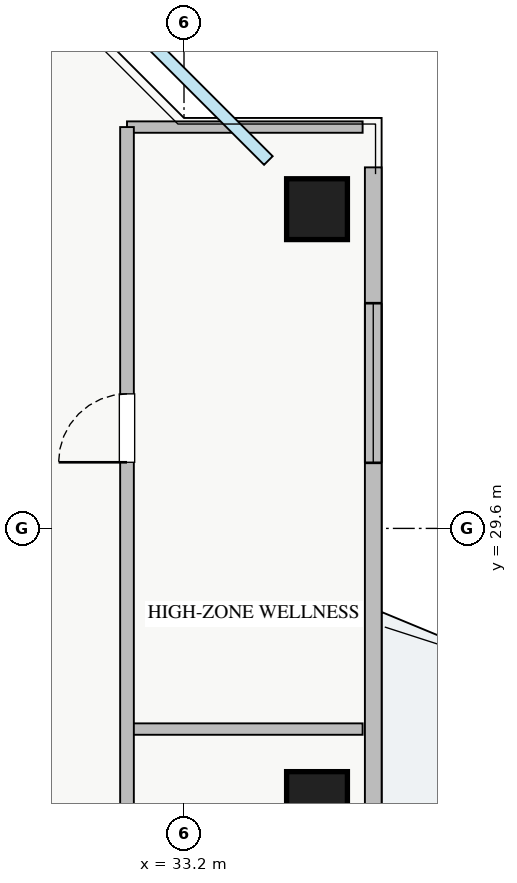
"""IFC4 building model, lengths in metres.
Left out: names, types, materials, properties, quantities, classifications, styles, units other than length and angle.
Written with IfcOpenShell. Run it as: python <this file> out.ifc"""

import sys

from ifc_helpers import new_model, si_unit, direction, frame, frame_2d, origin, origin_2d, place, context, subcontext, project, spatial, rectangle, extrude, source, transform, mapped, element, fill, save


model = new_model("IFC4")
c1 = context("Model", 3, precision=1e-05, world=origin(), true_north=direction((0.0, 1.0)))
c2 = subcontext(c1, "Body", "Model", "MODEL_VIEW")
j1 = project(units=[si_unit("LENGTHUNIT", "METRE"), si_unit("PLANEANGLEUNIT", "RADIAN")], contexts=[c1])
p1 = place(None, origin())
s1 = spatial("IfcSite", under=j1, at=p1, CompositionType="ELEMENT")
p2 = place(p1, origin())
s2 = spatial("IfcBuilding", under=s1, at=p2, CompositionType="ELEMENT")
p3 = place(p2, frame((0.0, 0.0, 206.75)))
s3 = spatial("IfcBuildingStorey", under=s2, at=p3, CompositionType="ELEMENT", Elevation=206.75)
m1 = source(origin(), c2, "Body", "SweptSolid", [
    extrude(rectangle(XDim=0.8, YDim=0.8, at=origin_2d()), origin(), (0.0, 0.0, 1.0), 3.25),
])
for number, where, z_axis, x_axis in (
    (1, (34.95, 26.0, 0.0), (0.0, 0.0, 1.0), (1.0, 0.0, 0.0)),
    (2, (34.95, 33.8, 0.0), (0.0, 0.0, 1.0), (1.0, 0.0, 0.0)),
):
    element("IfcColumn", number, at=place(p3, frame(where, z_axis=z_axis, x_axis=x_axis)), inside=s3, PredefinedType="COLUMN", context=c2, shape_type="MappedRepresentation", body=[
        mapped(m1, transform((0.0, 0.0, 0.0), x_axis=(1.0, 0.0, 0.0), y_axis=(0.0, 1.0, 0.0), z_axis=(0.0, 0.0, 1.0), scale=1.0)),
    ])
p4 = place(p3, frame((35.69, 11.65, 0.0), z_axis=(0.0, 0.0, 1.0), x_axis=(0.0, 1.0, 0.0)))
e3 = element("IfcWall", 3, at=p4, inside=s3, PredefinedType="STANDARD", context=c2, shape_type="SweptSolid", body=[
    extrude(rectangle(XDim=22.7, YDim=0.22, at=frame_2d((11.35, 0.0))), origin(), (0.0, 0.0, 1.0), 2.61),
])
p5 = place(p4, frame((12.2, 0.0, 0.0)))
e4 = element("IfcOpeningElement", 4, at=p5, cuts=e3, PredefinedType="OPENING", context=c2, shape_type="SweptSolid", body=[
    extrude(rectangle(XDim=1.2, YDim=2.1, at=frame_2d((0.6, 1.05))), frame((0.0, 0.12, 0.0), z_axis=(0.0, -1.0, 0.0), x_axis=(1.0, 0.0, 0.0)), (0.0, 0.0, 1.0), 0.24),
])
p6 = place(p4, frame((1.638, 0.0, 0.9)))
e5 = element("IfcOpeningElement", 5, at=p6, cuts=e3, PredefinedType="OPENING", context=c2, shape_type="SweptSolid", body=[
    extrude(rectangle(XDim=2.4, YDim=1.48, at=frame_2d((1.2, 0.74))), frame((0.0, 0.12, 0.0), z_axis=(0.0, -1.0, 0.0), x_axis=(1.0, 0.0, 0.0)), (0.0, 0.0, 1.0), 0.24),
])
p7 = place(p4, frame((18.813, 0.0, 0.9)))
e6 = element("IfcOpeningElement", 6, at=p7, cuts=e3, PredefinedType="OPENING", context=c2, shape_type="SweptSolid", body=[
    extrude(rectangle(XDim=2.1, YDim=1.48, at=frame_2d((1.05, 0.74))), frame((0.0, 0.12, 0.0), z_axis=(0.0, -1.0, 0.0), x_axis=(1.0, 0.0, 0.0)), (0.0, 0.0, 1.0), 0.24),
])
for number, where, z_axis, x_axis in (
    (7, (32.45, 34.88, 0.0), (0.0, 0.0, 1.0), (1.0, 0.0, 0.0)),
    (8, (32.45, 26.96, 0.0), (0.0, 0.0, 1.0), (1.0, 0.0, 0.0)),
):
    element("IfcWall", number, at=place(p3, frame(where, z_axis=z_axis, x_axis=x_axis)), inside=s3, PredefinedType="PARTITIONING", context=c2, shape_type="SweptSolid", body=[
        extrude(rectangle(XDim=3.1, YDim=0.15, at=frame_2d((1.55, 0.0))), origin(), (0.0, 0.0, 1.0), 3.07),
    ])
p8 = place(p3, frame((32.45, 11.12, 0.0), z_axis=(0.0, 0.0, 1.0), x_axis=(0.0, 1.0, 0.0)))
e9 = element("IfcWall", 9, at=p8, inside=s3, PredefinedType="PARTITIONING", context=c2, shape_type="SweptSolid", body=[
    extrude(rectangle(XDim=23.76, YDim=0.18, at=frame_2d((11.88, 0.0))), origin(), (0.0, 0.0, 1.0), 3.07),
])
p9 = place(p8, frame((3.295, 0.0, 0.0)))
e10 = element("IfcOpeningElement", 10, at=p9, cuts=e9, PredefinedType="OPENING", context=c2, shape_type="SweptSolid", body=[
    extrude(rectangle(XDim=0.9, YDim=2.05, at=frame_2d((0.45, 1.025))), frame((0.0, 0.1, 0.0), z_axis=(0.0, -1.0, 0.0), x_axis=(1.0, 0.0, 0.0)), (0.0, 0.0, 1.0), 0.2),
])
p10 = place(p8, frame((11.215, 0.0, 0.0)))
e11 = element("IfcOpeningElement", 11, at=p10, cuts=e9, PredefinedType="OPENING", context=c2, shape_type="SweptSolid", body=[
    extrude(rectangle(XDim=0.9, YDim=2.05, at=frame_2d((0.45, 1.025))), frame((0.0, 0.1, 0.0), z_axis=(0.0, -1.0, 0.0), x_axis=(1.0, 0.0, 0.0)), (0.0, 0.0, 1.0), 0.2),
])
p11 = place(p8, frame((19.35, 0.0, 0.0)))
e12 = element("IfcOpeningElement", 12, at=p11, cuts=e9, PredefinedType="OPENING", context=c2, shape_type="SweptSolid", body=[
    extrude(rectangle(XDim=0.9, YDim=2.05, at=frame_2d((0.45, 1.025))), frame((0.0, 0.1, 0.0), z_axis=(0.0, -1.0, 0.0), x_axis=(1.0, 0.0, 0.0)), (0.0, 0.0, 1.0), 0.2),
])
m2 = source(origin(), c2, "Body", "SweptSolid", [
    extrude(rectangle(XDim=2.1, YDim=1.48, at=frame_2d((1.05, 0.74))), frame((0.0, 0.03, 0.0), z_axis=(0.0, -1.0, 0.0), x_axis=(1.0, 0.0, 0.0)), (0.0, 0.0, 1.0), 0.06),
])
p12 = place(p7, origin())
e13 = element("IfcWindow", 13, at=p12, inside=s3, PartitioningType="TRIPLE_PANEL_VERTICAL", PredefinedType="WINDOW", context=c2, shape_type="MappedRepresentation", body=[
    mapped(m2, transform((0.0, 0.0, 0.0), x_axis=(1.0, 0.0, 0.0), y_axis=(0.0, 1.0, 0.0), z_axis=(0.0, 0.0, 1.0), scale=1.0)),
])
fill(e6, e13)
m3 = source(origin(), c2, "Body", "SweptSolid", [
    extrude(rectangle(XDim=0.9, YDim=2.05, at=frame_2d((0.45, 1.025))), frame((0.0, 0.025, 0.0), z_axis=(0.0, -1.0, 0.0), x_axis=(1.0, 0.0, 0.0)), (0.0, 0.0, 1.0), 0.05),
])
p13 = place(p11, origin())
e14 = element("IfcDoor", 14, at=p13, inside=s3, OperationType="SINGLE_SWING_LEFT", PredefinedType="DOOR", context=c2, shape_type="MappedRepresentation", body=[
    mapped(m3, transform((0.0, 0.0, 0.0), x_axis=(1.0, 0.0, 0.0), y_axis=(0.0, 1.0, 0.0), z_axis=(0.0, 0.0, 1.0), scale=1.0)),
])
fill(e12, e14)
save(model, sys.argv[1])
